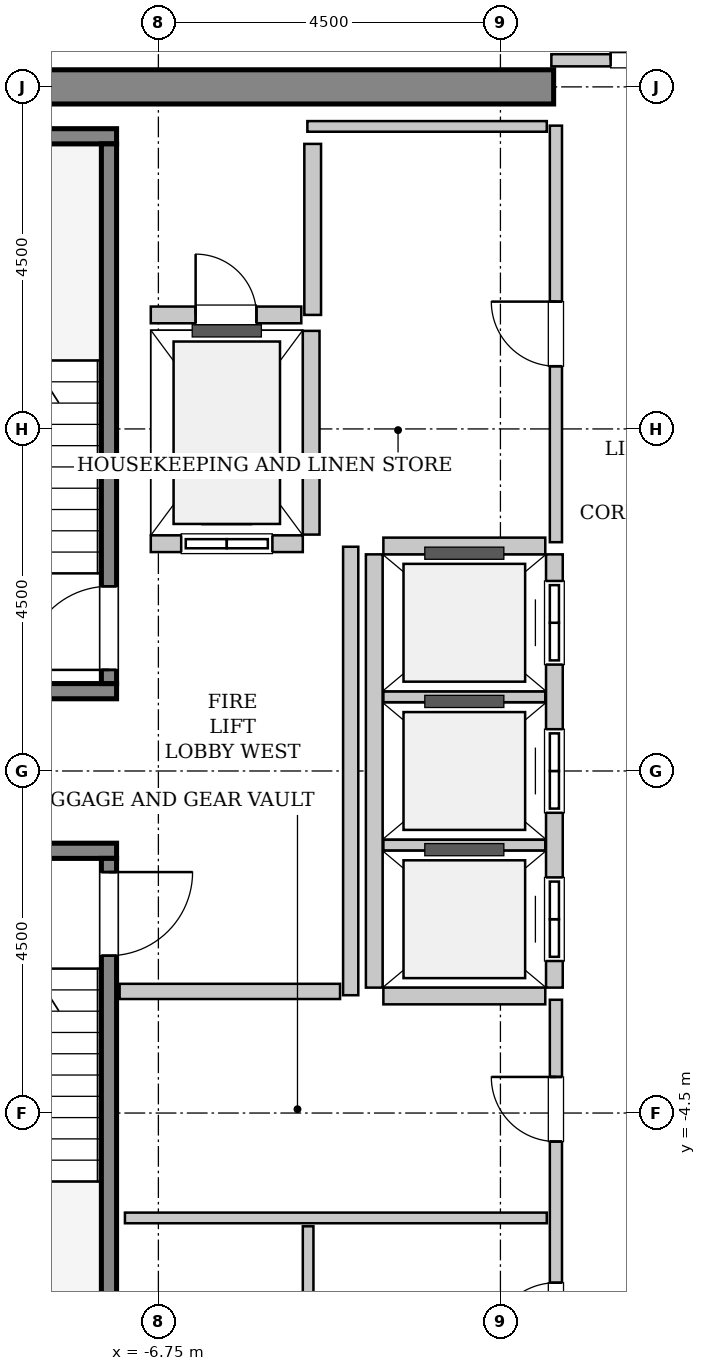
"""IFC4 building model, lengths in metres.
Left out: names, types, materials, properties, quantities, classifications, styles, units other than length and angle.
Written with IfcOpenShell. Run it as: python <this file> out.ifc"""

import sys

from ifc_helpers import new_model, si_unit, direction, frame, frame_2d, origin, place, context, subcontext, project, spatial, rectangle, extrude, source, transform, mapped, element, fill, save


model = new_model("IFC4")
c1 = context("Model", 3, precision=1e-05, world=origin(), true_north=direction((0.0, 1.0)))
c2 = subcontext(c1, "Body", "Model", "MODEL_VIEW")
j1 = project(units=[si_unit("LENGTHUNIT", "METRE"), si_unit("PLANEANGLEUNIT", "RADIAN")], contexts=[c1])
p1 = place(None, origin())
s1 = spatial("IfcSite", under=j1, at=p1, CompositionType="ELEMENT")
p2 = place(p1, origin())
s2 = spatial("IfcBuilding", under=s1, at=p2, CompositionType="ELEMENT")
p3 = place(p2, frame((0.0, 0.0, 276.0)))
s3 = spatial("IfcBuildingStorey", under=s2, at=p3, CompositionType="ELEMENT", Elevation=276.0)
m1 = source(origin(), c2, "Body", "SweptSolid", [
    extrude(rectangle(XDim=9.925, YDim=0.45, at=frame_2d((4.962, 0.0))), origin(), (0.0, 0.0, 1.0), 3.8),
])
p4 = place(p3, frame((-11.475, 9.0, 0.0), z_axis=(0.0, 0.0, 1.0), x_axis=(1.0, 0.0, 0.0)))
e1 = element("IfcWall", 1, at=p4, inside=s3, PredefinedType="SHEAR", context=c2, shape_type="MappedRepresentation", body=[
    mapped(m1, transform((0.0, 0.0, 0.0), x_axis=(1.0, 0.0, 0.0), y_axis=(0.0, 1.0, 0.0), z_axis=(0.0, 0.0, 1.0), scale=1.0)),
])
m2 = source(origin(), c2, "Body", "SweptSolid", [
    extrude(rectangle(XDim=3.4, YDim=0.2, at=frame_2d((1.7, 0.0))), origin(), (0.0, 0.0, 1.0), 3.8),
])
p5 = place(p3, frame((-7.3, 1.05, 0.0), z_axis=(0.0, 0.0, 1.0), x_axis=(-1.0, 0.0, 0.0)))
e2 = element("IfcWall", 2, at=p5, inside=s3, PredefinedType="SOLIDWALL", context=c2, shape_type="MappedRepresentation", body=[
    mapped(m2, transform((0.0, 0.0, 0.0), x_axis=(1.0, 0.0, 0.0), y_axis=(0.0, 1.0, 0.0), z_axis=(0.0, 0.0, 1.0), scale=1.0)),
])
m3 = source(origin(), c2, "Body", "SweptSolid", [
    extrude(rectangle(XDim=3.73, YDim=0.2, at=frame_2d((1.865, 0.0))), origin(), (0.0, 0.0, 1.0), 3.8),
])
p6 = place(p3, frame((-7.3, 8.35, 0.0), z_axis=(0.0, 0.0, 1.0), x_axis=(-1.0, 0.0, 0.0)))
e3 = element("IfcWall", 3, at=p6, inside=s3, PredefinedType="SOLIDWALL", context=c2, shape_type="MappedRepresentation", body=[
    mapped(m3, transform((0.0, 0.0, 0.0), x_axis=(1.0, 0.0, 0.0), y_axis=(0.0, 1.0, 0.0), z_axis=(0.0, 0.0, 1.0), scale=1.0)),
])
m4 = source(origin(), c2, "Body", "SweptSolid", [
    extrude(rectangle(XDim=7.1, YDim=0.2, at=frame_2d((3.55, 0.0))), origin(), (0.0, 0.0, 1.0), 3.8),
])
p7 = place(p3, frame((-7.4, 1.15, 0.0), z_axis=(0.0, 0.0, 1.0), x_axis=(0.0, 1.0, 0.0)))
e4 = element("IfcWall", 4, at=p7, inside=s3, PredefinedType="SOLIDWALL", context=c2, shape_type="MappedRepresentation", body=[
    mapped(m4, transform((0.0, 0.0, 0.0), x_axis=(1.0, 0.0, 0.0), y_axis=(0.0, 1.0, 0.0), z_axis=(0.0, 0.0, 1.0), scale=1.0)),
])
p8 = place(p7, frame((0.18, 0.0, 0.0)))
e5 = element("IfcOpeningElement", 5, at=p8, cuts=e4, PredefinedType="OPENING", context=c2, shape_type="SweptSolid", body=[
    extrude(rectangle(XDim=1.1, YDim=2.15, at=frame_2d((0.55, 1.075))), frame((0.0, 0.11, 0.0), z_axis=(0.0, -1.0, 0.0), x_axis=(1.0, 0.0, 0.0)), (0.0, 0.0, 1.0), 0.22),
])
p9 = place(p3, frame((-10.7, -1.05, 0.0), z_axis=(0.0, 0.0, 1.0), x_axis=(1.0, 0.0, 0.0)))
e6 = element("IfcWall", 6, at=p9, inside=s3, PredefinedType="SOLIDWALL", context=c2, shape_type="MappedRepresentation", body=[
    mapped(m2, transform((0.0, 0.0, 0.0), x_axis=(1.0, 0.0, 0.0), y_axis=(0.0, 1.0, 0.0), z_axis=(0.0, 0.0, 1.0), scale=1.0)),
])
p10 = place(p3, frame((-7.4, -1.15, 0.0), z_axis=(0.0, 0.0, 1.0), x_axis=(0.0, -1.0, 0.0)))
e7 = element("IfcWall", 7, at=p10, inside=s3, PredefinedType="SOLIDWALL", context=c2, shape_type="MappedRepresentation", body=[
    mapped(m4, transform((0.0, 0.0, 0.0), x_axis=(1.0, 0.0, 0.0), y_axis=(0.0, 1.0, 0.0), z_axis=(0.0, 0.0, 1.0), scale=1.0)),
])
p11 = place(p10, frame((0.18, 0.0, 0.0)))
e8 = element("IfcOpeningElement", 8, at=p11, cuts=e7, PredefinedType="OPENING", context=c2, shape_type="SweptSolid", body=[
    extrude(rectangle(XDim=1.1, YDim=2.15, at=frame_2d((0.55, 1.075))), frame((0.0, 0.11, 0.0), z_axis=(0.0, -1.0, 0.0), x_axis=(1.0, 0.0, 0.0)), (0.0, 0.0, 1.0), 0.22),
])
m5 = source(origin(), c2, "Body", "SweptSolid", [
    extrude(rectangle(XDim=2.0, YDim=0.22, at=frame_2d((1.0, 0.0))), origin(), (0.0, 0.0, 1.0), 3.535),
])
p12 = place(p3, frame((-6.85, 2.99, 0.0), z_axis=(0.0, 0.0, 1.0), x_axis=(1.0, 0.0, 0.0)))
e9 = element("IfcWall", 9, at=p12, inside=s3, PredefinedType="SOLIDWALL", context=c2, shape_type="MappedRepresentation", body=[
    mapped(m5, transform((0.0, 0.0, 0.0), x_axis=(1.0, 0.0, 0.0), y_axis=(0.0, 1.0, 0.0), z_axis=(0.0, 0.0, 1.0), scale=1.0)),
])
p13 = place(p12, frame((0.4, 0.0, 0.0)))
e10 = element("IfcOpeningElement", 10, at=p13, cuts=e9, PredefinedType="OPENING", context=c2, shape_type="SweptSolid", body=[
    extrude(rectangle(XDim=1.2, YDim=2.2, at=frame_2d((0.6, 1.1))), frame((0.0, 0.12, 0.0), z_axis=(0.0, -1.0, 0.0), x_axis=(1.0, 0.0, 0.0)), (0.0, 0.0, 1.0), 0.24),
])
m6 = source(origin(), c2, "Body", "SweptSolid", [
    extrude(rectangle(XDim=2.68, YDim=0.22, at=frame_2d((1.34, 0.0))), origin(), (0.0, 0.0, 1.0), 3.535),
])
p14 = place(p3, frame((-4.74, 3.11, 0.0), z_axis=(0.0, 0.0, 1.0), x_axis=(0.0, 1.0, 0.0)))
e11 = element("IfcWall", 11, at=p14, inside=s3, PredefinedType="SOLIDWALL", context=c2, shape_type="MappedRepresentation", body=[
    mapped(m6, transform((0.0, 0.0, 0.0), x_axis=(1.0, 0.0, 0.0), y_axis=(0.0, 1.0, 0.0), z_axis=(0.0, 0.0, 1.0), scale=1.0)),
])
m7 = source(origin(), c2, "Body", "SweptSolid", [
    extrude(rectangle(XDim=5.7, YDim=0.22, at=frame_2d((2.85, 0.0))), origin(), (0.0, 0.0, 1.0), 3.535),
])
p15 = place(p3, frame((-1.54, -2.85, 0.0), z_axis=(0.0, 0.0, 1.0), x_axis=(0.0, 1.0, 0.0)))
e12 = element("IfcWall", 12, at=p15, inside=s3, PredefinedType="SOLIDWALL", context=c2, shape_type="MappedRepresentation", body=[
    mapped(m7, transform((0.0, 0.0, 0.0), x_axis=(1.0, 0.0, 0.0), y_axis=(0.0, 1.0, 0.0), z_axis=(0.0, 0.0, 1.0), scale=1.0)),
])
p16 = place(p15, frame((0.35, 0.0, 0.0)))
e13 = element("IfcOpeningElement", 13, at=p16, cuts=e12, PredefinedType="OPENING", context=c2, shape_type="SweptSolid", body=[
    extrude(rectangle(XDim=1.1, YDim=2.2, at=frame_2d((0.55, 1.1))), frame((0.0, 0.12, 0.0), z_axis=(0.0, -1.0, 0.0), x_axis=(1.0, 0.0, 0.0)), (0.0, 0.0, 1.0), 0.24),
])
p17 = place(p15, frame((2.3, 0.0, 0.0)))
e14 = element("IfcOpeningElement", 14, at=p17, cuts=e12, PredefinedType="OPENING", context=c2, shape_type="SweptSolid", body=[
    extrude(rectangle(XDim=1.1, YDim=2.2, at=frame_2d((0.55, 1.1))), frame((0.0, 0.12, 0.0), z_axis=(0.0, -1.0, 0.0), x_axis=(1.0, 0.0, 0.0)), (0.0, 0.0, 1.0), 0.24),
])
p18 = place(p15, frame((4.25, 0.0, 0.0)))
e15 = element("IfcOpeningElement", 15, at=p18, cuts=e12, PredefinedType="OPENING", context=c2, shape_type="SweptSolid", body=[
    extrude(rectangle(XDim=1.1, YDim=2.2, at=frame_2d((0.55, 1.1))), frame((0.0, 0.12, 0.0), z_axis=(0.0, -1.0, 0.0), x_axis=(1.0, 0.0, 0.0)), (0.0, 0.0, 1.0), 0.24),
])
p19 = place(p3, frame((-3.91, 2.85, 0.0), z_axis=(0.0, 0.0, 1.0), x_axis=(0.0, -1.0, 0.0)))
e16 = element("IfcWall", 16, at=p19, inside=s3, PredefinedType="SOLIDWALL", context=c2, shape_type="MappedRepresentation", body=[
    mapped(m7, transform((0.0, 0.0, 0.0), x_axis=(1.0, 0.0, 0.0), y_axis=(0.0, 1.0, 0.0), z_axis=(0.0, 0.0, 1.0), scale=1.0)),
])
m8 = source(origin(), c2, "Body", "SweptSolid", [
    extrude(rectangle(XDim=2.13, YDim=0.22, at=frame_2d((1.065, 0.0))), origin(), (0.0, 0.0, 1.0), 3.535),
])
p20 = place(p3, frame((-3.79, -2.96, 0.0), z_axis=(0.0, 0.0, 1.0), x_axis=(1.0, 0.0, 0.0)))
e17 = element("IfcWall", 17, at=p20, inside=s3, PredefinedType="SOLIDWALL", context=c2, shape_type="MappedRepresentation", body=[
    mapped(m8, transform((0.0, 0.0, 0.0), x_axis=(1.0, 0.0, 0.0), y_axis=(0.0, 1.0, 0.0), z_axis=(0.0, 0.0, 1.0), scale=1.0)),
])
m9 = source(origin(), c2, "Body", "SweptSolid", [
    extrude(rectangle(XDim=2.13, YDim=0.14, at=frame_2d((1.065, 0.0))), origin(), (0.0, 0.0, 1.0), 3.535),
])
for number, where, z_axis, x_axis in (
    (18, (-3.79, -0.975, 0.0), (0.0, 0.0, 1.0), (1.0, 0.0, 0.0)),
    (19, (-3.79, 0.975, 0.0), (0.0, 0.0, 1.0), (1.0, 0.0, 0.0)),
):
    element("IfcWall", number, at=place(p3, frame(where, z_axis=z_axis, x_axis=x_axis)), inside=s3, PredefinedType="PARTITIONING", context=c2, shape_type="MappedRepresentation", body=[
        mapped(m9, transform((0.0, 0.0, 0.0), x_axis=(1.0, 0.0, 0.0), y_axis=(0.0, 1.0, 0.0), z_axis=(0.0, 0.0, 1.0), scale=1.0)),
    ])
p21 = place(p3, frame((-1.66, 2.96, 0.0), z_axis=(0.0, 0.0, 1.0), x_axis=(-1.0, 0.0, 0.0)))
e20 = element("IfcWall", 20, at=p21, inside=s3, PredefinedType="SOLIDWALL", context=c2, shape_type="MappedRepresentation", body=[
    mapped(m8, transform((0.0, 0.0, 0.0), x_axis=(1.0, 0.0, 0.0), y_axis=(0.0, 1.0, 0.0), z_axis=(0.0, 0.0, 1.0), scale=1.0)),
])
m10 = source(origin(), c2, "Body", "SweptSolid", [
    extrude(rectangle(XDim=2.25, YDim=0.22, at=frame_2d((1.125, 0.0))), origin(), (0.0, 0.0, 1.0), 3.535),
])
p22 = place(p3, frame((-4.72, 6.0, 0.0), z_axis=(0.0, 0.0, 1.0), x_axis=(0.0, 1.0, 0.0)))
e21 = element("IfcWall", 21, at=p22, inside=s3, PredefinedType="SOLIDWALL", context=c2, shape_type="MappedRepresentation", body=[
    mapped(m10, transform((0.0, 0.0, 0.0), x_axis=(1.0, 0.0, 0.0), y_axis=(0.0, 1.0, 0.0), z_axis=(0.0, 0.0, 1.0), scale=1.0)),
])
m11 = source(origin(), c2, "Body", "SweptSolid", [
    extrude(rectangle(XDim=1.98, YDim=0.22, at=frame_2d((0.99, 0.0))), origin(), (0.0, 0.0, 1.0), 3.535),
])
p23 = place(p3, frame((-6.85, 6.0, 0.0), z_axis=(0.0, 0.0, 1.0), x_axis=(1.0, 0.0, 0.0)))
e22 = element("IfcWall", 22, at=p23, inside=s3, PredefinedType="SOLIDWALL", context=c2, shape_type="MappedRepresentation", body=[
    mapped(m11, transform((0.0, 0.0, 0.0), x_axis=(1.0, 0.0, 0.0), y_axis=(0.0, 1.0, 0.0), z_axis=(0.0, 0.0, 1.0), scale=1.0)),
])
p24 = place(p23, frame((0.59, 0.0, 0.0)))
e23 = element("IfcOpeningElement", 23, at=p24, cuts=e22, PredefinedType="OPENING", context=c2, shape_type="SweptSolid", body=[
    extrude(rectangle(XDim=0.8, YDim=2.0, at=frame_2d((0.4, 1.0))), frame((0.0, 0.12, 0.0), z_axis=(0.0, -1.0, 0.0), x_axis=(1.0, 0.0, 0.0)), (0.0, 0.0, 1.0), 0.24),
])
m12 = source(origin(), c2, "Body", "SweptSolid", [
    extrude(rectangle(XDim=5.9, YDim=0.2, at=frame_2d((2.95, 0.0))), origin(), (0.0, 0.0, 1.0), 3.535),
])
p25 = place(p3, frame((-4.22, -2.95, 0.0), z_axis=(0.0, 0.0, 1.0), x_axis=(0.0, 1.0, 0.0)))
e24 = element("IfcWall", 24, at=p25, inside=s3, PredefinedType="PARTITIONING", context=c2, shape_type="MappedRepresentation", body=[
    mapped(m12, transform((0.0, 0.0, 0.0), x_axis=(1.0, 0.0, 0.0), y_axis=(0.0, 1.0, 0.0), z_axis=(0.0, 0.0, 1.0), scale=1.0)),
])
m13 = source(origin(), c2, "Body", "SweptSolid", [
    extrude(rectangle(XDim=2.9, YDim=0.2, at=frame_2d((1.45, 0.0))), origin(), (0.0, 0.0, 1.0), 3.535),
])
p26 = place(p3, frame((-7.26, -2.9, 0.0), z_axis=(0.0, 0.0, 1.0), x_axis=(1.0, 0.0, 0.0)))
e25 = element("IfcWall", 25, at=p26, inside=s3, PredefinedType="PARTITIONING", context=c2, shape_type="MappedRepresentation", body=[
    mapped(m13, transform((0.0, 0.0, 0.0), x_axis=(1.0, 0.0, 0.0), y_axis=(0.0, 1.0, 0.0), z_axis=(0.0, 0.0, 1.0), scale=1.0)),
])
m14 = source(origin(), c2, "Body", "SweptSolid", [
    extrude(rectangle(XDim=3.16, YDim=0.16, at=frame_2d((1.58, 0.0))), origin(), (0.0, 0.0, 1.0), 2.625),
])
p27 = place(p3, frame((-1.58, 9.35, 0.0), z_axis=(0.0, 0.0, 1.0), x_axis=(1.0, 0.0, 0.0)))
e26 = element("IfcWall", 26, at=p27, inside=s3, PredefinedType="PARTITIONING", context=c2, shape_type="MappedRepresentation", body=[
    mapped(m14, transform((0.0, 0.0, 0.0), x_axis=(1.0, 0.0, 0.0), y_axis=(0.0, 1.0, 0.0), z_axis=(0.0, 0.0, 1.0), scale=1.0)),
])
p28 = place(p27, frame((0.78, 0.0, 0.0)))
e27 = element("IfcOpeningElement", 27, at=p28, cuts=e26, PredefinedType="OPENING", context=c2, shape_type="SweptSolid", body=[
    extrude(rectangle(XDim=1.6, YDim=2.3, at=frame_2d((0.8, 1.15))), frame((0.0, 0.09, 0.0), z_axis=(0.0, -1.0, 0.0), x_axis=(1.0, 0.0, 0.0)), (0.0, 0.0, 1.0), 0.18),
])
m15 = source(origin(), c2, "Body", "SweptSolid", [
    extrude(rectangle(XDim=5.48, YDim=0.16, at=frame_2d((2.74, 0.0))), origin(), (0.0, 0.0, 1.0), 3.535),
])
p29 = place(p3, frame((-1.52, 3.01, 0.0), z_axis=(0.0, 0.0, 1.0), x_axis=(0.0, 1.0, 0.0)))
e28 = element("IfcWall", 28, at=p29, inside=s3, PredefinedType="PARTITIONING", context=c2, shape_type="MappedRepresentation", body=[
    mapped(m15, transform((0.0, 0.0, 0.0), x_axis=(1.0, 0.0, 0.0), y_axis=(0.0, 1.0, 0.0), z_axis=(0.0, 0.0, 1.0), scale=1.0)),
])
p30 = place(p29, frame((2.315, 0.0, 0.0)))
e29 = element("IfcOpeningElement", 29, at=p30, cuts=e28, PredefinedType="OPENING", context=c2, shape_type="SweptSolid", body=[
    extrude(rectangle(XDim=0.85, YDim=2.1, at=frame_2d((0.425, 1.05))), frame((0.0, 0.09, 0.0), z_axis=(0.0, -1.0, 0.0), x_axis=(1.0, 0.0, 0.0)), (0.0, 0.0, 1.0), 0.18),
])
m16 = source(origin(), c2, "Body", "SweptSolid", [
    extrude(rectangle(XDim=3.15, YDim=0.14, at=frame_2d((1.575, 0.0))), origin(), (0.0, 0.0, 1.0), 3.535),
])
p31 = place(p3, frame((-4.79, 8.48, 0.0), z_axis=(0.0, 0.0, 1.0), x_axis=(1.0, 0.0, 0.0)))
e30 = element("IfcWall", 30, at=p31, inside=s3, PredefinedType="PARTITIONING", context=c2, shape_type="MappedRepresentation", body=[
    mapped(m16, transform((0.0, 0.0, 0.0), x_axis=(1.0, 0.0, 0.0), y_axis=(0.0, 1.0, 0.0), z_axis=(0.0, 0.0, 1.0), scale=1.0)),
])
p32 = place(p3, frame((-1.52, -8.49, 0.0), z_axis=(0.0, 0.0, 1.0), x_axis=(0.0, 1.0, 0.0)))
e31 = element("IfcWall", 31, at=p32, inside=s3, PredefinedType="PARTITIONING", context=c2, shape_type="MappedRepresentation", body=[
    mapped(m15, transform((0.0, 0.0, 0.0), x_axis=(1.0, 0.0, 0.0), y_axis=(0.0, 1.0, 0.0), z_axis=(0.0, 0.0, 1.0), scale=1.0)),
])
p33 = place(p32, frame((0.907, 0.0, 0.0)))
e32 = element("IfcOpeningElement", 32, at=p33, cuts=e31, PredefinedType="OPENING", context=c2, shape_type="SweptSolid", body=[
    extrude(rectangle(XDim=0.85, YDim=2.1, at=frame_2d((0.425, 1.05))), frame((0.0, 0.09, 0.0), z_axis=(0.0, -1.0, 0.0), x_axis=(1.0, 0.0, 0.0)), (0.0, 0.0, 1.0), 0.18),
])
p34 = place(p32, frame((3.615, 0.0, 0.0)))
e33 = element("IfcOpeningElement", 33, at=p34, cuts=e31, PredefinedType="OPENING", context=c2, shape_type="SweptSolid", body=[
    extrude(rectangle(XDim=0.85, YDim=2.1, at=frame_2d((0.425, 1.05))), frame((0.0, 0.09, 0.0), z_axis=(0.0, -1.0, 0.0), x_axis=(1.0, 0.0, 0.0)), (0.0, 0.0, 1.0), 0.18),
])
m17 = source(origin(), c2, "Body", "SweptSolid", [
    extrude(rectangle(XDim=5.55, YDim=0.14, at=frame_2d((2.775, 0.0))), origin(), (0.0, 0.0, 1.0), 3.535),
])
p35 = place(p3, frame((-7.19, -5.88, 0.0), z_axis=(0.0, 0.0, 1.0), x_axis=(1.0, 0.0, 0.0)))
e34 = element("IfcWall", 34, at=p35, inside=s3, PredefinedType="PARTITIONING", context=c2, shape_type="MappedRepresentation", body=[
    mapped(m17, transform((0.0, 0.0, 0.0), x_axis=(1.0, 0.0, 0.0), y_axis=(0.0, 1.0, 0.0), z_axis=(0.0, 0.0, 1.0), scale=1.0)),
])
m18 = source(origin(), c2, "Body", "SweptSolid", [
    extrude(rectangle(XDim=2.38, YDim=0.14, at=frame_2d((1.19, 0.0))), origin(), (0.0, 0.0, 1.0), 3.535),
])
p36 = place(p3, frame((-4.78, -8.37, 0.0), z_axis=(0.0, 0.0, 1.0), x_axis=(0.0, 1.0, 0.0)))
e35 = element("IfcWall", 35, at=p36, inside=s3, PredefinedType="PARTITIONING", context=c2, shape_type="MappedRepresentation", body=[
    mapped(m18, transform((0.0, 0.0, 0.0), x_axis=(1.0, 0.0, 0.0), y_axis=(0.0, 1.0, 0.0), z_axis=(0.0, 0.0, 1.0), scale=1.0)),
])
m19 = source(origin(), c2, "Body", "SweptSolid", [
    extrude(rectangle(XDim=1.1, YDim=2.15, at=frame_2d((0.55, 1.075))), frame((0.0, 0.025, 0.0), z_axis=(0.0, -1.0, 0.0), x_axis=(1.0, 0.0, 0.0)), (0.0, 0.0, 1.0), 0.05),
])
p37 = place(p8, origin())
e36 = element("IfcDoor", 36, at=p37, inside=s3, OperationType="SINGLE_SWING_LEFT", PredefinedType="DOOR", context=c2, shape_type="MappedRepresentation", body=[
    mapped(m19, transform((0.0, 0.0, 0.0), x_axis=(1.0, 0.0, 0.0), y_axis=(0.0, 1.0, 0.0), z_axis=(0.0, 0.0, 1.0), scale=1.0)),
])
fill(e5, e36)
p38 = place(p11, origin())
e37 = element("IfcDoor", 37, at=p38, inside=s3, OperationType="SINGLE_SWING_LEFT", PredefinedType="DOOR", context=c2, shape_type="MappedRepresentation", body=[
    mapped(m19, transform((0.0, 0.0, 0.0), x_axis=(1.0, 0.0, 0.0), y_axis=(0.0, 1.0, 0.0), z_axis=(0.0, 0.0, 1.0), scale=1.0)),
])
fill(e8, e37)
m20 = source(origin(), c2, "Body", "SweptSolid", [
    extrude(rectangle(XDim=1.2, YDim=2.2, at=frame_2d((0.6, 1.1))), frame((0.0, 0.025, 0.0), z_axis=(0.0, -1.0, 0.0), x_axis=(1.0, 0.0, 0.0)), (0.0, 0.0, 1.0), 0.05),
])
p39 = place(p13, origin())
e38 = element("IfcDoor", 38, at=p39, inside=s3, OperationType="SLIDING_TO_LEFT", PredefinedType="DOOR", context=c2, shape_type="MappedRepresentation", body=[
    mapped(m20, transform((0.0, 0.0, 0.0), x_axis=(1.0, 0.0, 0.0), y_axis=(0.0, 1.0, 0.0), z_axis=(0.0, 0.0, 1.0), scale=1.0)),
])
fill(e10, e38)
m21 = source(origin(), c2, "Body", "SweptSolid", [
    extrude(rectangle(XDim=1.1, YDim=2.2, at=frame_2d((0.55, 1.1))), frame((0.0, 0.025, 0.0), z_axis=(0.0, -1.0, 0.0), x_axis=(1.0, 0.0, 0.0)), (0.0, 0.0, 1.0), 0.05),
])
p40 = place(p16, origin())
e39 = element("IfcDoor", 39, at=p40, inside=s3, OperationType="DOUBLE_DOOR_SLIDING", PredefinedType="DOOR", context=c2, shape_type="MappedRepresentation", body=[
    mapped(m21, transform((0.0, 0.0, 0.0), x_axis=(1.0, 0.0, 0.0), y_axis=(0.0, 1.0, 0.0), z_axis=(0.0, 0.0, 1.0), scale=1.0)),
])
fill(e13, e39)
p41 = place(p17, origin())
e40 = element("IfcDoor", 40, at=p41, inside=s3, OperationType="DOUBLE_DOOR_SLIDING", PredefinedType="DOOR", context=c2, shape_type="MappedRepresentation", body=[
    mapped(m21, transform((0.0, 0.0, 0.0), x_axis=(1.0, 0.0, 0.0), y_axis=(0.0, 1.0, 0.0), z_axis=(0.0, 0.0, 1.0), scale=1.0)),
])
fill(e14, e40)
p42 = place(p18, origin())
e41 = element("IfcDoor", 41, at=p42, inside=s3, OperationType="DOUBLE_DOOR_SLIDING", PredefinedType="DOOR", context=c2, shape_type="MappedRepresentation", body=[
    mapped(m21, transform((0.0, 0.0, 0.0), x_axis=(1.0, 0.0, 0.0), y_axis=(0.0, 1.0, 0.0), z_axis=(0.0, 0.0, 1.0), scale=1.0)),
])
fill(e15, e41)
m22 = source(origin(), c2, "Body", "SweptSolid", [
    extrude(rectangle(XDim=0.8, YDim=2.0, at=frame_2d((0.4, 1.0))), frame((0.0, 0.025, 0.0), z_axis=(0.0, -1.0, 0.0), x_axis=(1.0, 0.0, 0.0)), (0.0, 0.0, 1.0), 0.05),
])
p43 = place(p24, origin())
e42 = element("IfcDoor", 42, at=p43, inside=s3, OperationType="SINGLE_SWING_LEFT", PredefinedType="TRAPDOOR", context=c2, shape_type="MappedRepresentation", body=[
    mapped(m22, transform((0.0, 0.0, 0.0), x_axis=(1.0, 0.0, 0.0), y_axis=(0.0, 1.0, 0.0), z_axis=(0.0, 0.0, 1.0), scale=1.0)),
])
fill(e23, e42)
m23 = source(origin(), c2, "Body", "SweptSolid", [
    extrude(rectangle(XDim=1.6, YDim=2.3, at=frame_2d((0.8, 1.15))), frame((0.0, 0.025, 0.0), z_axis=(0.0, -1.0, 0.0), x_axis=(1.0, 0.0, 0.0)), (0.0, 0.0, 1.0), 0.05),
])
p44 = place(p28, origin())
e43 = element("IfcDoor", 43, at=p44, inside=s3, OperationType="DOUBLE_DOOR_SINGLE_SWING", PredefinedType="DOOR", context=c2, shape_type="MappedRepresentation", body=[
    mapped(m23, transform((0.0, 0.0, 0.0), x_axis=(1.0, 0.0, 0.0), y_axis=(0.0, 1.0, 0.0), z_axis=(0.0, 0.0, 1.0), scale=1.0)),
])
fill(e27, e43)
m24 = source(origin(), c2, "Body", "SweptSolid", [
    extrude(rectangle(XDim=0.85, YDim=2.1, at=frame_2d((0.425, 1.05))), frame((0.0, 0.025, 0.0), z_axis=(0.0, -1.0, 0.0), x_axis=(1.0, 0.0, 0.0)), (0.0, 0.0, 1.0), 0.05),
])
p45 = place(p30, origin())
e44 = element("IfcDoor", 44, at=p45, inside=s3, OperationType="SINGLE_SWING_RIGHT", PredefinedType="DOOR", context=c2, shape_type="MappedRepresentation", body=[
    mapped(m24, transform((0.0, 0.0, 0.0), x_axis=(1.0, 0.0, 0.0), y_axis=(0.0, 1.0, 0.0), z_axis=(0.0, 0.0, 1.0), scale=1.0)),
])
fill(e29, e44)
p46 = place(p33, origin())
e45 = element("IfcDoor", 45, at=p46, inside=s3, OperationType="SINGLE_SWING_LEFT", PredefinedType="DOOR", context=c2, shape_type="MappedRepresentation", body=[
    mapped(m24, transform((0.0, 0.0, 0.0), x_axis=(1.0, 0.0, 0.0), y_axis=(0.0, 1.0, 0.0), z_axis=(0.0, 0.0, 1.0), scale=1.0)),
])
fill(e32, e45)
p47 = place(p34, origin())
e46 = element("IfcDoor", 46, at=p47, inside=s3, OperationType="SINGLE_SWING_RIGHT", PredefinedType="DOOR", context=c2, shape_type="MappedRepresentation", body=[
    mapped(m24, transform((0.0, 0.0, 0.0), x_axis=(1.0, 0.0, 0.0), y_axis=(0.0, 1.0, 0.0), z_axis=(0.0, 0.0, 1.0), scale=1.0)),
])
fill(e33, e46)
save(model, sys.argv[1])
